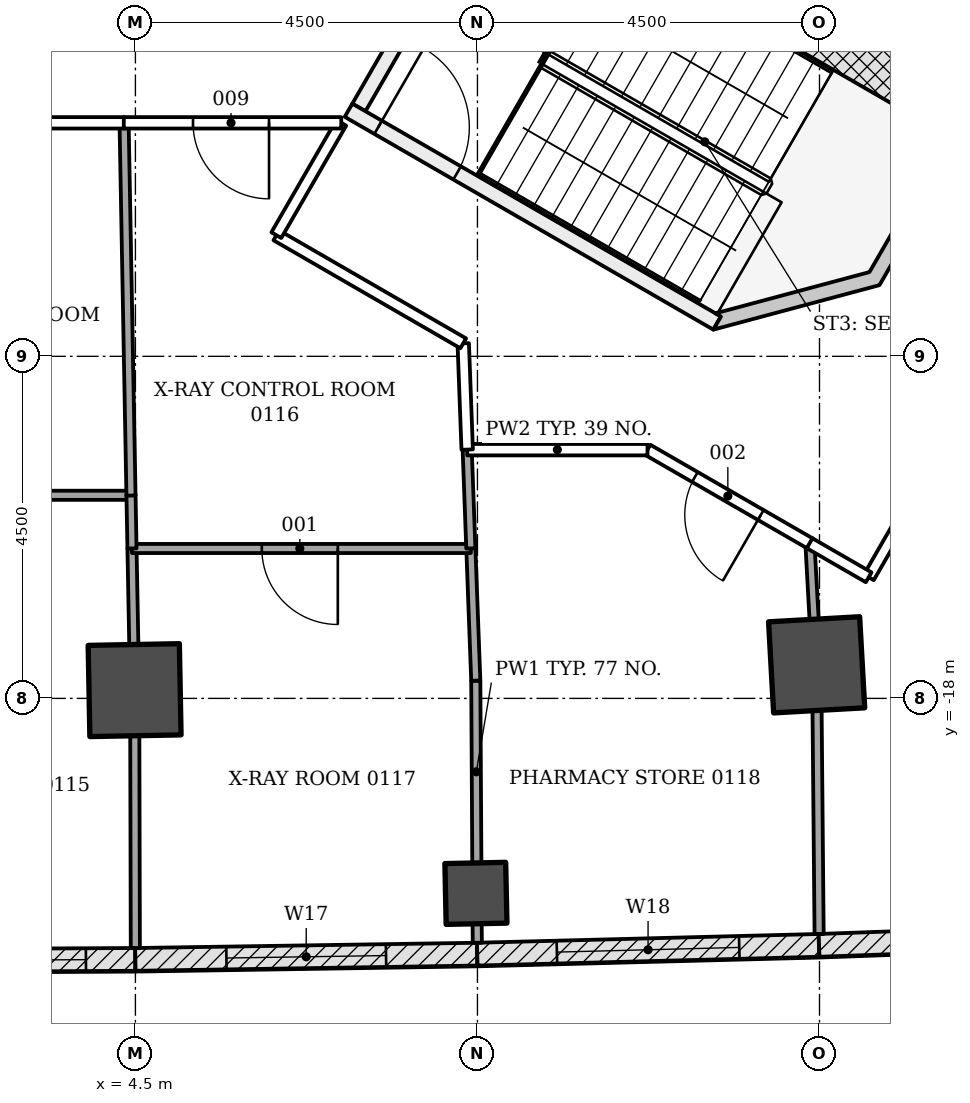
"""IFC4 building model, lengths in metres.
Left out: names, types, materials, properties, quantities, classifications, styles, units other than length and angle.
Written with IfcOpenShell. Run it as: python <this file> out.ifc"""

import sys

from ifc_helpers import new_model, si_unit, direction, frame, frame_2d, origin, origin_2d, place, context, subcontext, project, spatial, polyline, rectangle, outline, extrude, element, fill, save


model = new_model("IFC4")
c1 = context("Model", 3, precision=1e-05, world=origin(), true_north=direction((0.0, 1.0)))
c2 = subcontext(c1, "Body", "Model", "MODEL_VIEW")
j1 = project(units=[si_unit("LENGTHUNIT", "METRE"), si_unit("PLANEANGLEUNIT", "RADIAN")], contexts=[c1])
p1 = place(None, origin())
s1 = spatial("IfcSite", under=j1, at=p1, CompositionType="ELEMENT")
p2 = place(p1, origin())
s2 = spatial("IfcBuilding", under=s1, at=p2, CompositionType="ELEMENT")
p3 = place(p2, frame((0.0, 0.0, 6.0)))
s3 = spatial("IfcBuildingStorey", under=s2, at=p3, CompositionType="ELEMENT", Elevation=6.0)
for number, where, z_axis, x_axis in (
    (1, (4.49, -17.892, -0.25), (0.0, 0.0, 1.0), (0.019, -1.0, 0.0)),
    (2, (13.462, -17.558, -0.25), (0.0, 0.0, 1.0), (0.056, -0.998, 0.0)),
):
    element("IfcColumn", number, at=place(p3, frame(where, z_axis=z_axis, x_axis=x_axis)), inside=s3, PredefinedType="COLUMN", context=c2, shape_type="SweptSolid", body=[
        extrude(rectangle(XDim=1.2, YDim=1.2, at=origin_2d()), origin(), (0.0, 0.0, 1.0), 4.5),
    ])
p4 = place(p3, frame((8.98, -20.565, -0.25), z_axis=(0.0, 0.0, 1.0), x_axis=(0.020537122929, -0.99978909105, 0.0)))
e3 = element("IfcColumn", 3, at=p4, inside=s3, PredefinedType="COLUMN", context=c2, shape_type="SweptSolid", body=[
    extrude(rectangle(XDim=0.8, YDim=0.8, at=origin_2d()), origin(), (0.0, 0.0, 1.0), 4.5),
])
p5 = place(p3, frame((9.922, -5.728, -0.25), z_axis=(0.0, 0.0, 1.0), x_axis=(0.866028046028, -0.499995423472, 0.0)))
e4 = element("IfcWall", 4, at=p5, inside=s3, PredefinedType="SHEAR", context=c2, shape_type="SweptSolid", body=[
    extrude(rectangle(XDim=14.633, YDim=0.9, at=frame_2d((7.316, 0.0))), origin(), (0.0, 0.0, 1.0), 4.5),
])
p6 = place(p5, frame((7.35, 0.0, 0.25)))
e5 = element("IfcOpeningElement", 5, at=p6, cuts=e4, PredefinedType="OPENING", context=c2, shape_type="SweptSolid", body=[
    extrude(rectangle(XDim=1.5, YDim=2.1, at=frame_2d((0.75, 1.05))), frame((0.0, 0.46, 0.0), z_axis=(0.0, -1.0, 0.0), x_axis=(1.0, 0.0, 0.0)), (0.0, 0.0, 1.0), 0.92),
])
p7 = place(p3, frame((4.497, -21.434, 0.0), z_axis=(0.0, 0.0, 1.0), x_axis=(-0.999986693461, -0.005158769258, 0.0)))
e6 = element("IfcWall", 6, at=p7, inside=s3, PredefinedType="NOTDEFINED", context=c2, shape_type="SweptSolid", body=[
    extrude(rectangle(XDim=4.496, YDim=0.3, at=frame_2d((2.248, 0.0))), origin(), (0.0, 0.0, 1.0), 4.25),
])
p8 = place(p7, frame((0.648, 0.0, 0.8)))
e7 = element("IfcOpeningElement", 7, at=p8, cuts=e6, PredefinedType="OPENING", context=c2, shape_type="SweptSolid", body=[
    extrude(rectangle(XDim=3.2, YDim=2.7, at=frame_2d((1.6, 1.35))), frame((0.0, 0.16, 0.0), z_axis=(0.0, -1.0, 0.0), x_axis=(1.0, 0.0, 0.0)), (0.0, 0.0, 1.0), 0.32),
])
p9 = place(p3, frame((8.995, -21.365, 0.0), z_axis=(0.0, 0.0, 1.0), x_axis=(-0.999881921814, -0.015366926462, 0.0)))
e8 = element("IfcWall", 8, at=p9, inside=s3, PredefinedType="NOTDEFINED", context=c2, shape_type="SweptSolid", body=[
    extrude(rectangle(XDim=4.496, YDim=0.3, at=frame_2d((2.248, 0.0))), origin(), (0.0, 0.0, 1.0), 4.25),
])
p10 = place(p9, frame((1.198, 0.0, 0.8)))
e9 = element("IfcOpeningElement", 9, at=p10, cuts=e8, PredefinedType="OPENING", context=c2, shape_type="SweptSolid", body=[
    extrude(rectangle(XDim=2.1, YDim=3.0, at=frame_2d((1.05, 1.5))), frame((0.0, 0.16, 0.0), z_axis=(0.0, -1.0, 0.0), x_axis=(1.0, 0.0, 0.0)), (0.0, 0.0, 1.0), 0.32),
])
p11 = place(p3, frame((13.492, -21.25, 0.0), z_axis=(0.0, 0.0, 1.0), x_axis=(-0.999671466587, -0.025631209312, 0.0)))
e10 = element("IfcWall", 10, at=p11, inside=s3, PredefinedType="NOTDEFINED", context=c2, shape_type="SweptSolid", body=[
    extrude(rectangle(XDim=4.496, YDim=0.3, at=frame_2d((2.248, 0.0))), origin(), (0.0, 0.0, 1.0), 4.25),
])
p12 = place(p11, frame((1.048, 0.0, 0.9)))
e11 = element("IfcOpeningElement", 11, at=p12, cuts=e10, PredefinedType="OPENING", context=c2, shape_type="SweptSolid", body=[
    extrude(rectangle(XDim=2.4, YDim=2.4, at=frame_2d((1.2, 1.2))), frame((0.0, 0.16, 0.0), z_axis=(0.0, -1.0, 0.0), x_axis=(1.0, 0.0, 0.0)), (0.0, 0.0, 1.0), 0.32),
])
p13 = place(p3, frame((17.988, -21.088, 0.0), z_axis=(0.0, 0.0, 1.0), x_axis=(-0.999355640029, -0.035892962294, 0.0)))
e12 = element("IfcWall", 12, at=p13, inside=s3, PredefinedType="NOTDEFINED", context=c2, shape_type="SweptSolid", body=[
    extrude(rectangle(XDim=4.496, YDim=0.3, at=frame_2d((2.248, 0.0))), origin(), (0.0, 0.0, 1.0), 4.25),
])
p14 = place(p13, frame((1.048, 0.0, 0.9)))
e13 = element("IfcOpeningElement", 13, at=p14, cuts=e12, PredefinedType="OPENING", context=c2, shape_type="SweptSolid", body=[
    extrude(rectangle(XDim=2.4, YDim=2.4, at=frame_2d((1.2, 1.2))), frame((0.0, 0.16, 0.0), z_axis=(0.0, -1.0, 0.0), x_axis=(1.0, 0.0, 0.0)), (0.0, 0.0, 1.0), 0.32),
])
p15 = place(p3, frame((7.44, -10.226, -0.25), z_axis=(0.0, 0.0, 1.0), x_axis=(0.500022077904, 0.866012656725, 0.0)))
e14 = element("IfcWall", 14, at=p15, inside=s3, PredefinedType="SHEAR", context=c2, shape_type="SweptSolid", body=[
    extrude(rectangle(XDim=3.55, YDim=0.2, at=frame_2d((1.775, 0.0))), origin(), (0.0, 0.0, 1.0), 4.5),
])
p16 = place(p15, frame((1.175, 0.0, 0.25)))
e15 = element("IfcOpeningElement", 15, at=p16, cuts=e14, PredefinedType="OPENING", context=c2, shape_type="SweptSolid", body=[
    extrude(rectangle(XDim=1.2, YDim=2.1, at=frame_2d((0.6, 1.05))), frame((0.0, 0.11, 0.0), z_axis=(0.0, -1.0, 0.0), x_axis=(1.0, 0.0, 0.0)), (0.0, 0.0, 1.0), 0.22),
])
p17 = place(p3, frame((7.304, -10.262, -0.25), z_axis=(0.0, 0.0, 1.0), x_axis=(0.866026594901, -0.49999793692, 0.0)))
e16 = element("IfcWall", 16, at=p17, inside=s3, PredefinedType="SHEAR", context=c2, shape_type="SweptSolid", body=[
    extrude(rectangle(XDim=5.6, YDim=0.2, at=frame_2d((2.8, 0.0))), origin(), (0.0, 0.0, 1.0), 4.5),
])
p18 = place(p17, frame((0.45, 0.0, 0.25)))
e17 = element("IfcOpeningElement", 17, at=p18, cuts=e16, PredefinedType="OPENING", context=c2, shape_type="SweptSolid", body=[
    extrude(rectangle(XDim=1.2, YDim=2.1, at=frame_2d((0.6, 1.05))), frame((0.0, 0.11, 0.0), z_axis=(0.0, -1.0, 0.0), x_axis=(1.0, 0.0, 0.0)), (0.0, 0.0, 1.0), 0.22),
])
p19 = place(p3, frame((9.413, -6.61, -0.25), z_axis=(0.0, 0.0, 1.0), x_axis=(0.866018442252, -0.500012057535, 0.0)))
e18 = element("IfcWall", 18, at=p19, inside=s3, PredefinedType="SHEAR", context=c2, shape_type="SweptSolid", body=[
    extrude(rectangle(XDim=7.2, YDim=1.136, at=frame_2d((3.6, 0.0))), origin(), (0.0, 0.0, 1.0), 4.5),
])
p20 = place(p3, frame((0.0, 0.0, -0.25)))
e19 = element("IfcWall", 19, at=p20, inside=s3, PredefinedType="SHEAR", context=c2, shape_type="SweptSolid", body=[
    extrude(outline(polyline([(12.104, -13.149), (14.289, -12.563), (15.364, -10.701), (15.191, -10.601), (14.157, -12.392), (12.132, -12.934), (12.204, -12.976), (12.204, -12.976), (12.204, -12.976), (12.204, -12.976), (12.204, -12.976), (12.204, -12.976), (12.204, -12.976), (12.204, -12.976), (12.204, -12.976), (12.204, -12.976), (12.204, -12.976), (12.204, -12.976), (12.204, -12.976), (12.204, -12.976), (12.204, -12.976), (12.204, -12.976), (12.204, -12.976), (12.104, -13.149)])), origin(), (0.0, 0.0, 1.0), 4.5),
])
p21 = place(p3, frame((8.992, -20.165, 0.0), z_axis=(0.0, 0.0, 1.0), x_axis=(-0.005803200997, 0.999983161287, 0.0)))
e20 = element("IfcWall", 20, at=p21, inside=s3, PredefinedType="PARTITIONING", context=c2, shape_type="SweptSolid", body=[
    extrude(rectangle(XDim=2.398, YDim=0.12, at=frame_2d((1.199, 0.0))), origin(), (0.0, 0.0, 1.0), 3.638),
])
p22 = place(p3, frame((8.978, -17.767, 0.0), z_axis=(0.0, 0.0, 1.0), x_axis=(-0.037229075286, 0.999306757684, 0.0)))
e21 = element("IfcWall", 21, at=p22, inside=s3, PredefinedType="PARTITIONING", context=c2, shape_type="SweptSolid", body=[
    extrude(rectangle(XDim=1.744, YDim=0.12, at=frame_2d((0.872, 0.0))), origin(), (0.0, 0.0, 1.0), 3.638),
])
p23 = place(p3, frame((8.998, -21.215, 0.0), z_axis=(0.0, 0.0, 1.0), x_axis=(-0.007812261592, 0.999969483819, 0.0)))
e22 = element("IfcWall", 22, at=p23, inside=s3, PredefinedType="PARTITIONING", context=c2, shape_type="SweptSolid", body=[
    extrude(rectangle(XDim=0.25, YDim=0.12, at=frame_2d((0.125, 0.0))), origin(), (0.0, 0.0, 1.0), 4.25),
])
p24 = place(p3, frame((4.455, -16.024, 0.0), z_axis=(0.0, 0.0, 1.0), x_axis=(0.018879100933, -0.999821773892, 0.0)))
e23 = element("IfcWall", 23, at=p24, inside=s3, PredefinedType="PARTITIONING", context=c2, shape_type="SweptSolid", body=[
    extrude(rectangle(XDim=1.267, YDim=0.12, at=frame_2d((0.634, 0.0))), origin(), (0.0, 0.0, 1.0), 3.638),
])
p25 = place(p3, frame((4.492, -18.492, 0.0), z_axis=(0.0, 0.0, 1.0), x_axis=(0.002535843543, -0.999996784744, 0.0)))
e24 = element("IfcWall", 24, at=p25, inside=s3, PredefinedType="PARTITIONING", context=c2, shape_type="SweptSolid", body=[
    extrude(rectangle(XDim=2.792, YDim=0.12, at=frame_2d((1.396, 0.0))), origin(), (0.0, 0.0, 1.0), 3.633),
])
p26 = place(p3, frame((8.913, -16.028, 0.0), z_axis=(0.0, 0.0, 1.0), x_axis=(-1.0, 0.0, 0.0)))
e25 = element("IfcWall", 25, at=p26, inside=s3, PredefinedType="PARTITIONING", context=c2, shape_type="SweptSolid", body=[
    extrude(rectangle(XDim=4.458, YDim=0.12, at=frame_2d((2.229, 0.0))), origin(), (0.0, 0.0, 1.0), 3.638),
])
p27 = place(p26, frame((1.75, 0.0, 0.0)))
e26 = element("IfcOpeningElement", 26, at=p27, cuts=e25, PredefinedType="OPENING", context=c2, shape_type="SweptSolid", body=[
    extrude(rectangle(XDim=1.0, YDim=2.1, at=frame_2d((0.5, 1.05))), frame((0.0, 0.07, 0.0), z_axis=(0.0, -1.0, 0.0), x_axis=(1.0, 0.0, 0.0)), (0.0, 0.0, 1.0), 0.14),
])
p28 = place(p3, frame((13.429, -16.959, 0.0), z_axis=(0.0, 0.0, 1.0), x_axis=(-0.055063393043, 0.998482860517, 0.0)))
e27 = element("IfcWall", 27, at=p28, inside=s3, PredefinedType="PARTITIONING", context=c2, shape_type="SweptSolid", body=[
    extrude(rectangle(XDim=0.998, YDim=0.12, at=frame_2d((0.499, 0.0))), origin(), (0.0, 0.0, 1.0), 3.638),
])
p29 = place(p3, frame((13.495, -21.099, 0.0), z_axis=(0.0, 0.0, 1.0), x_axis=(-0.009216581037, 0.999957526415, 0.0)))
e28 = element("IfcWall", 28, at=p29, inside=s3, PredefinedType="PARTITIONING", context=c2, shape_type="SweptSolid", body=[
    extrude(rectangle(XDim=2.94, YDim=0.12, at=frame_2d((1.47, 0.0))), origin(), (0.0, 0.0, 1.0), 3.633),
])
p30 = place(p3, frame((8.865, -14.724, 0.0), z_axis=(0.0, 0.0, 1.0), x_axis=(0.03688700211, -0.999319442959, 0.0)))
e29 = element("IfcWall", 29, at=p30, inside=s3, PredefinedType="PARTITIONING", context=c2, shape_type="SweptSolid", body=[
    extrude(rectangle(XDim=1.304, YDim=0.12, at=frame_2d((0.652, 0.0))), origin(), (0.0, 0.0, 1.0), 3.638),
])
p31 = place(p3, frame((13.377, -15.962, 0.0), z_axis=(0.0, 0.0, 1.0), x_axis=(-0.866302389159, 0.499519940081, 0.0)))
e30 = element("IfcWall", 30, at=p31, inside=s3, PredefinedType="PARTITIONING", context=c2, shape_type="SweptSolid", body=[
    extrude(rectangle(XDim=2.47, YDim=0.15, at=frame_2d((1.235, 0.0))), origin(), (0.0, 0.0, 1.0), 3.638),
])
p32 = place(p31, frame((0.75, 0.0, 0.0)))
e31 = element("IfcOpeningElement", 31, at=p32, cuts=e30, PredefinedType="OPENING", context=c2, shape_type="SweptSolid", body=[
    extrude(rectangle(XDim=1.0, YDim=2.1, at=frame_2d((0.5, 1.05))), frame((0.0, 0.085, 0.0), z_axis=(0.0, -1.0, 0.0), x_axis=(1.0, 0.0, 0.0)), (0.0, 0.0, 1.0), 0.17),
])
p33 = place(p3, frame((11.237, -14.728, 0.0), z_axis=(0.0, 0.0, 1.0), x_axis=(-1.0, 0.0, 0.0)))
e32 = element("IfcWall", 32, at=p33, inside=s3, PredefinedType="PARTITIONING", context=c2, shape_type="SweptSolid", body=[
    extrude(rectangle(XDim=2.372, YDim=0.15, at=frame_2d((1.186, 0.0))), origin(), (0.0, 0.0, 1.0), 3.638),
])
p34 = place(p3, frame((4.442, -15.328, 0.0), z_axis=(0.0, 0.0, 1.0), x_axis=(-1.0, 0.0, 0.0)))
e33 = element("IfcWall", 33, at=p34, inside=s3, PredefinedType="PARTITIONING", context=c2, shape_type="SweptSolid", body=[
    extrude(rectangle(XDim=4.442, YDim=0.12, at=frame_2d((2.221, 0.0))), origin(), (0.0, 0.0, 1.0), 3.638),
])
p35 = place(p34, frame((1.75, 0.0, 0.0)))
e34 = element("IfcOpeningElement", 34, at=p35, cuts=e33, PredefinedType="OPENING", context=c2, shape_type="SweptSolid", body=[
    extrude(rectangle(XDim=1.0, YDim=2.1, at=frame_2d((0.5, 1.05))), frame((0.0, 0.07, 0.0), z_axis=(0.0, -1.0, 0.0), x_axis=(1.0, 0.0, 0.0)), (0.0, 0.0, 1.0), 0.14),
])
p36 = place(p3, frame((4.455, -16.027, 0.0), z_axis=(0.0, 0.0, 1.0), x_axis=(-0.01874670497, 0.999824265085, 0.0)))
e35 = element("IfcWall", 35, at=p36, inside=s3, PredefinedType="PARTITIONING", context=c2, shape_type="SweptSolid", body=[
    extrude(rectangle(XDim=0.703, YDim=0.12, at=frame_2d((0.352, 0.0))), origin(), (0.0, 0.0, 1.0), 3.638),
])
p37 = place(p3, frame((17.491, -10.618, 0.0), z_axis=(0.0, 0.0, 1.0), x_axis=(-0.499969057507, -0.866043267704, 0.0)))
e36 = element("IfcWall", 36, at=p37, inside=s3, PredefinedType="PARTITIONING", context=c2, shape_type="SweptSolid", body=[
    extrude(rectangle(XDim=6.685, YDim=0.15, at=frame_2d((3.342, 0.0))), origin(), (0.0, 0.0, 1.0), 3.638),
])
p38 = place(p37, frame((2.45, 0.0, 0.0)))
e37 = element("IfcOpeningElement", 37, at=p38, cuts=e36, PredefinedType="OPENING", context=c2, shape_type="SweptSolid", body=[
    extrude(rectangle(XDim=1.8, YDim=2.1, at=frame_2d((0.9, 1.05))), frame((0.0, 0.085, 0.0), z_axis=(0.0, -1.0, 0.0), x_axis=(1.0, 0.0, 0.0)), (0.0, 0.0, 1.0), 0.17),
])
p39 = place(p3, frame((14.147, -16.407, 0.0), z_axis=(0.0, 0.0, 1.0), x_axis=(-0.866276218641, 0.499565324075, 0.0)))
e38 = element("IfcWall", 38, at=p39, inside=s3, PredefinedType="PARTITIONING", context=c2, shape_type="SweptSolid", body=[
    extrude(rectangle(XDim=0.897, YDim=0.15, at=frame_2d((0.448, 0.0))), origin(), (0.0, 0.0, 1.0), 3.638),
])
p40 = place(p3, frame((4.442, -15.332, 0.0), z_axis=(0.0, 0.0, 1.0), x_axis=(-0.018519952131, 0.999828490979, 0.0)))
e39 = element("IfcWall", 39, at=p40, inside=s3, PredefinedType="PARTITIONING", context=c2, shape_type="SweptSolid", body=[
    extrude(rectangle(XDim=4.904, YDim=0.12, at=frame_2d((2.452, 0.0))), origin(), (0.0, 0.0, 1.0), 3.638),
])
p41 = place(p3, frame((4.355, -10.428, 0.0), z_axis=(0.0, 0.0, 1.0), x_axis=(-1.0, 0.0, 0.0)))
e40 = element("IfcWall", 40, at=p41, inside=s3, PredefinedType="PARTITIONING", context=c2, shape_type="SweptSolid", body=[
    extrude(rectangle(XDim=4.359, YDim=0.15, at=frame_2d((2.179, 0.0))), origin(), (0.0, 0.0, 1.0), 3.638),
])
p42 = place(p41, frame((1.65, 0.0, 0.0)))
e41 = element("IfcOpeningElement", 41, at=p42, cuts=e40, PredefinedType="OPENING", context=c2, shape_type="SweptSolid", body=[
    extrude(rectangle(XDim=1.0, YDim=2.1, at=frame_2d((0.5, 1.05))), frame((0.0, 0.085, 0.0), z_axis=(0.0, -1.0, 0.0), x_axis=(1.0, 0.0, 0.0)), (0.0, 0.0, 1.0), 0.17),
])
p43 = place(p3, frame((8.865, -14.727, 0.0), z_axis=(0.0, 0.0, 1.0), x_axis=(-0.037173032443, 0.999308843981, 0.0)))
e42 = element("IfcWall", 42, at=p43, inside=s3, PredefinedType="PARTITIONING", context=c2, shape_type="SweptSolid", body=[
    extrude(rectangle(XDim=1.399, YDim=0.15, at=frame_2d((0.699, 0.0))), origin(), (0.0, 0.0, 1.0), 3.638),
])
p44 = place(p3, frame((8.813, -13.329, 0.0), z_axis=(0.0, 0.0, 1.0), x_axis=(-0.865804661524, 0.50038214205, 0.0)))
e43 = element("IfcWall", 43, at=p44, inside=s3, PredefinedType="PARTITIONING", context=c2, shape_type="SweptSolid", body=[
    extrude(rectangle(XDim=2.84, YDim=0.15, at=frame_2d((1.42, 0.0))), origin(), (0.0, 0.0, 1.0), 3.638),
])
p45 = place(p3, frame((6.354, -11.906, 0.0), z_axis=(0.0, 0.0, 1.0), x_axis=(0.500291894738, 0.865856812677, 0.0)))
e44 = element("IfcWall", 44, at=p45, inside=s3, PredefinedType="PARTITIONING", context=c2, shape_type="SweptSolid", body=[
    extrude(rectangle(XDim=1.707, YDim=0.15, at=frame_2d((0.854, 0.0))), origin(), (0.0, 0.0, 1.0), 4.25),
])
p46 = place(p3, frame((7.208, -10.428, 0.0), z_axis=(0.0, 0.0, 1.0), x_axis=(-1.0, 0.0, 0.0)))
e45 = element("IfcWall", 45, at=p46, inside=s3, PredefinedType="PARTITIONING", context=c2, shape_type="SweptSolid", body=[
    extrude(rectangle(XDim=2.861, YDim=0.15, at=frame_2d((1.431, 0.0))), origin(), (0.0, 0.0, 1.0), 3.638),
])
p47 = place(p46, frame((0.95, 0.0, 0.0)))
e46 = element("IfcOpeningElement", 46, at=p47, cuts=e45, PredefinedType="OPENING", context=c2, shape_type="SweptSolid", body=[
    extrude(rectangle(XDim=1.0, YDim=2.1, at=frame_2d((0.5, 1.05))), frame((0.0, 0.085, 0.0), z_axis=(0.0, -1.0, 0.0), x_axis=(1.0, 0.0, 0.0)), (0.0, 0.0, 1.0), 0.17),
])
p48 = place(p8, origin())
e47 = element("IfcWindow", 47, at=p48, inside=s3, PartitioningType="TRIPLE_PANEL_VERTICAL", PredefinedType="WINDOW", context=c2, shape_type="SweptSolid", body=[
    extrude(rectangle(XDim=3.2, YDim=2.7, at=frame_2d((1.6, 1.35))), frame((0.0, 0.03, 0.0), z_axis=(0.0, -1.0, 0.0), x_axis=(1.0, 0.0, 0.0)), (0.0, 0.0, 1.0), 0.06),
])
fill(e7, e47)
p49 = place(p10, origin())
e48 = element("IfcWindow", 48, at=p49, inside=s3, PartitioningType="DOUBLE_PANEL_HORIZONTAL", PredefinedType="WINDOW", context=c2, shape_type="SweptSolid", body=[
    extrude(rectangle(XDim=2.1, YDim=3.0, at=frame_2d((1.05, 1.5))), frame((0.0, 0.03, 0.0), z_axis=(0.0, -1.0, 0.0), x_axis=(1.0, 0.0, 0.0)), (0.0, 0.0, 1.0), 0.06),
])
fill(e9, e48)
p50 = place(p12, origin())
e49 = element("IfcWindow", 49, at=p50, inside=s3, PartitioningType="DOUBLE_PANEL_VERTICAL", PredefinedType="WINDOW", context=c2, shape_type="SweptSolid", body=[
    extrude(rectangle(XDim=2.4, YDim=2.4, at=frame_2d((1.2, 1.2))), frame((0.0, 0.03, 0.0), z_axis=(0.0, -1.0, 0.0), x_axis=(1.0, 0.0, 0.0)), (0.0, 0.0, 1.0), 0.06),
])
fill(e11, e49)
p51 = place(p18, origin())
e50 = element("IfcDoor", 50, at=p51, inside=s3, OperationType="SINGLE_SWING_LEFT", PredefinedType="DOOR", context=c2, shape_type="SweptSolid", body=[
    extrude(rectangle(XDim=1.2, YDim=2.1, at=frame_2d((0.6, 1.05))), frame((0.0, 0.025, 0.0), z_axis=(0.0, -1.0, 0.0), x_axis=(1.0, 0.0, 0.0)), (0.0, 0.0, 1.0), 0.05),
])
fill(e17, e50)
p52 = place(p27, origin())
e51 = element("IfcDoor", 51, at=p52, inside=s3, OperationType="SINGLE_SWING_RIGHT", PredefinedType="DOOR", context=c2, shape_type="SweptSolid", body=[
    extrude(rectangle(XDim=1.0, YDim=2.1, at=frame_2d((0.5, 1.05))), frame((0.0, 0.025, 0.0), z_axis=(0.0, -1.0, 0.0), x_axis=(1.0, 0.0, 0.0)), (0.0, 0.0, 1.0), 0.05),
])
fill(e26, e51)
p53 = place(p32, origin())
e52 = element("IfcDoor", 52, at=p53, inside=s3, OperationType="SINGLE_SWING_RIGHT", PredefinedType="DOOR", context=c2, shape_type="SweptSolid", body=[
    extrude(rectangle(XDim=1.0, YDim=2.1, at=frame_2d((0.5, 1.05))), frame((0.0, 0.025, 0.0), z_axis=(0.0, -1.0, 0.0), x_axis=(1.0, 0.0, 0.0)), (0.0, 0.0, 1.0), 0.05),
])
fill(e31, e52)
p54 = place(p47, origin())
e53 = element("IfcDoor", 53, at=p54, inside=s3, OperationType="SINGLE_SWING_RIGHT", PredefinedType="DOOR", context=c2, shape_type="SweptSolid", body=[
    extrude(rectangle(XDim=1.0, YDim=2.1, at=frame_2d((0.5, 1.05))), frame((0.0, 0.025, 0.0), z_axis=(0.0, -1.0, 0.0), x_axis=(1.0, 0.0, 0.0)), (0.0, 0.0, 1.0), 0.05),
])
fill(e46, e53)
save(model, sys.argv[1])
